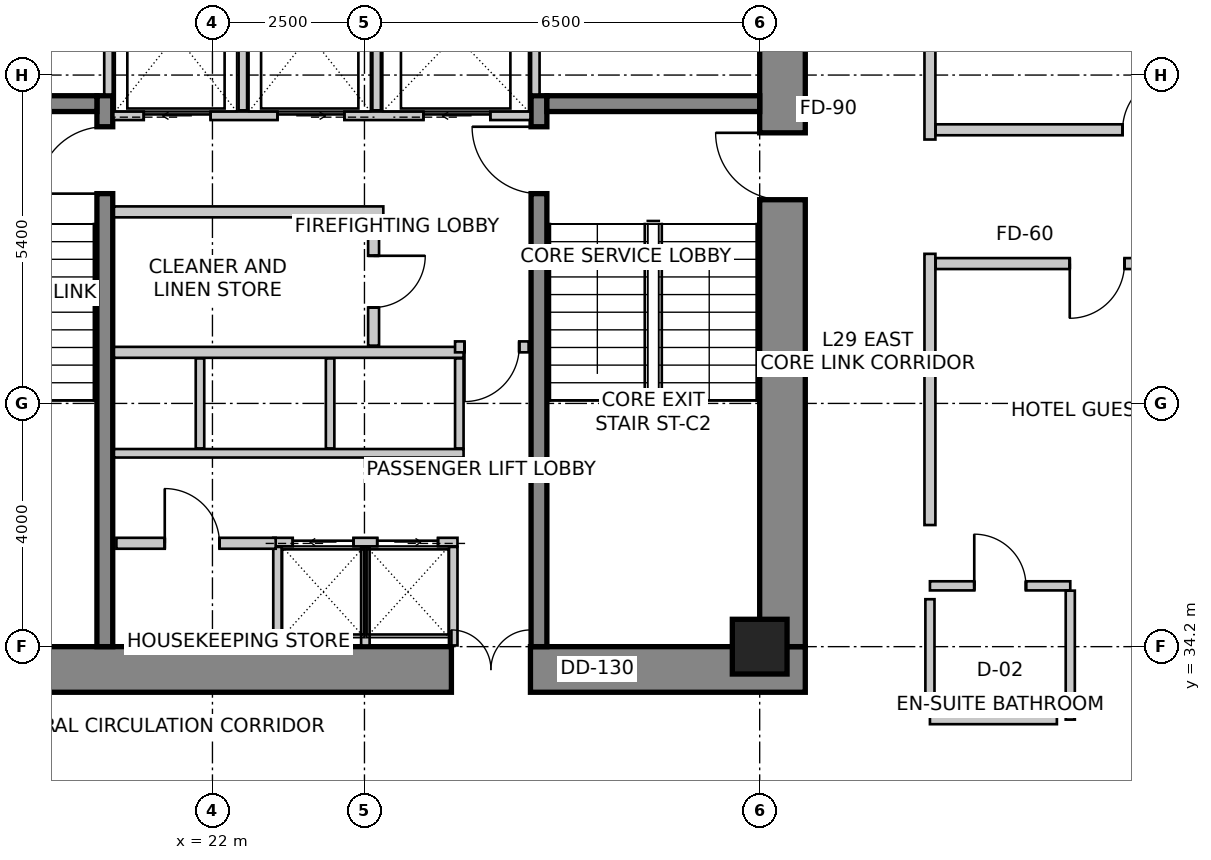
"""IFC4 building model, lengths in metres.
Left out: names, types, materials, properties, quantities, classifications, styles, units other than length and angle.
Written with IfcOpenShell. Run it as: python <this file> out.ifc"""

import sys

from ifc_helpers import new_model, si_unit, direction, frame, frame_2d, origin, origin_2d, place, context, subcontext, project, spatial, rectangle, extrude, source, transform, mapped, element, fill, save


model = new_model("IFC4")
c1 = context("Model", 3, precision=1e-05, world=origin(), true_north=direction((0.0, 1.0)))
c2 = subcontext(c1, "Body", "Model", "MODEL_VIEW")
j1 = project(units=[si_unit("LENGTHUNIT", "METRE"), si_unit("PLANEANGLEUNIT", "RADIAN")], contexts=[c1])
p1 = place(None, origin())
s1 = spatial("IfcSite", under=j1, at=p1, CompositionType="ELEMENT")
p2 = place(p1, origin())
s2 = spatial("IfcBuilding", under=s1, at=p2, CompositionType="ELEMENT")
p3 = place(p2, frame((0.0, 0.0, 121.4)))
s3 = spatial("IfcBuildingStorey", under=s2, at=p3, CompositionType="ELEMENT", Elevation=121.4)
p4 = place(p3, frame((15.85, 33.825, 0.0), z_axis=(0.0, 0.0, 1.0), x_axis=(1.0, 0.0, 0.0)))
e1 = element("IfcWall", 1, at=p4, inside=s3, PredefinedType="SHEAR", context=c2, shape_type="SweptSolid", body=[
    extrude(rectangle(XDim=15.9, YDim=0.75, at=frame_2d((7.95, 0.0))), origin(), (0.0, 0.0, 1.0), 3.6),
])
m1 = source(origin(), c2, "Body", "SweptSolid", [
    extrude(rectangle(XDim=1.3, YDim=2.15, at=frame_2d((0.65, 1.075))), frame((0.0, 0.385, 0.0), z_axis=(0.0, -1.0, 0.0), x_axis=(1.0, 0.0, 0.0)), (0.0, 0.0, 1.0), 0.77),
])
p5 = place(p4, frame((10.08, 0.0, 0.0)))
e2 = element("IfcOpeningElement", 2, at=p5, cuts=e1, PredefinedType="OPENING", context=c2, shape_type="MappedRepresentation", body=[
    mapped(m1, transform((0.0, 0.0, 0.0), scale=1.0)),
])
p6 = place(p3, frame((31.375, 34.2, 0.0), z_axis=(0.0, 0.0, 1.0), x_axis=(0.0, 1.0, 0.0)))
e3 = element("IfcWall", 3, at=p6, inside=s3, PredefinedType="SHEAR", context=c2, shape_type="SweptSolid", body=[
    extrude(rectangle(XDim=11.4, YDim=0.75, at=frame_2d((5.7, 0.0))), origin(), (0.0, 0.0, 1.0), 3.6),
])
m2 = source(origin(), c2, "Body", "SweptSolid", [
    extrude(rectangle(XDim=1.1, YDim=2.15, at=frame_2d((0.55, 1.075))), frame((0.0, 0.385, 0.0), z_axis=(0.0, -1.0, 0.0), x_axis=(1.0, 0.0, 0.0)), (0.0, 0.0, 1.0), 0.77),
])
p7 = place(p6, frame((7.35, 0.0, 0.0)))
e4 = element("IfcOpeningElement", 4, at=p7, cuts=e3, PredefinedType="OPENING", context=c2, shape_type="MappedRepresentation", body=[
    mapped(m2, transform((0.0, 0.0, 0.0), scale=1.0)),
])
p8 = place(p3, frame((20.23, 34.2, 0.0), z_axis=(0.0, 0.0, 1.0), x_axis=(0.0, 1.0, 0.0)))
e5 = element("IfcWall", 5, at=p8, inside=s3, PredefinedType="SHEAR", context=c2, shape_type="SweptSolid", body=[
    extrude(rectangle(XDim=9.06, YDim=0.26, at=frame_2d((4.53, 0.0))), origin(), (0.0, 0.0, 1.0), 3.6),
])
m3 = source(origin(), c2, "Body", "SweptSolid", [
    extrude(rectangle(XDim=1.1, YDim=2.15, at=frame_2d((0.55, 1.075))), frame((0.0, 0.14, 0.0), z_axis=(0.0, -1.0, 0.0), x_axis=(1.0, 0.0, 0.0)), (0.0, 0.0, 1.0), 0.28),
])
p9 = place(p8, frame((7.45, 0.0, 0.0)))
e6 = element("IfcOpeningElement", 6, at=p9, cuts=e5, PredefinedType="OPENING", context=c2, shape_type="MappedRepresentation", body=[
    mapped(m3, transform((0.0, 0.0, 0.0), scale=1.0)),
])
p10 = place(p3, frame((27.37, 34.2, 0.0), z_axis=(0.0, 0.0, 1.0), x_axis=(0.0, 1.0, 0.0)))
e7 = element("IfcWall", 7, at=p10, inside=s3, PredefinedType="SHEAR", context=c2, shape_type="SweptSolid", body=[
    extrude(rectangle(XDim=9.06, YDim=0.26, at=frame_2d((4.53, 0.0))), origin(), (0.0, 0.0, 1.0), 3.6),
])
p11 = place(p10, frame((7.45, 0.0, 0.0)))
e8 = element("IfcOpeningElement", 8, at=p11, cuts=e7, PredefinedType="OPENING", context=c2, shape_type="MappedRepresentation", body=[
    mapped(m3, transform((0.0, 0.0, 0.0), scale=1.0)),
])
for number, where, z_axis, x_axis in (
    (9, (16.6, 43.13, 0.0), (0.0, 0.0, 1.0), (1.0, 0.0, 0.0)),
    (10, (27.5, 43.13, 0.0), (0.0, 0.0, 1.0), (1.0, 0.0, 0.0)),
):
    element("IfcWall", number, at=place(p3, frame(where, z_axis=z_axis, x_axis=x_axis)), inside=s3, PredefinedType="SHEAR", context=c2, shape_type="SweptSolid", body=[
        extrude(rectangle(XDim=3.5, YDim=0.26, at=frame_2d((1.75, 0.0))), origin(), (0.0, 0.0, 1.0), 3.6),
    ])
m4 = source(origin(), c2, "Body", "SweptSolid", [
    extrude(rectangle(XDim=0.9, YDim=0.9, at=origin_2d()), origin(), (0.0, 0.0, 1.0), 3.6),
])
p12 = place(p3, frame((31.0, 34.2, 0.0), z_axis=(0.0, 0.0, 1.0), x_axis=(1.0, 0.0, 0.0)))
e11 = element("IfcColumn", 11, at=p12, inside=s3, PredefinedType="COLUMN", context=c2, shape_type="MappedRepresentation", body=[
    mapped(m4, transform((0.0, 0.0, 0.0), scale=1.0)),
])
p13 = place(p3, frame((20.37, 42.93, 0.0), z_axis=(0.0, 0.0, 1.0), x_axis=(1.0, 0.0, 0.0)))
e12 = element("IfcWall", 12, at=p13, inside=s3, PredefinedType="SOLIDWALL", context=c2, shape_type="SweptSolid", body=[
    extrude(rectangle(XDim=6.86, YDim=0.14, at=frame_2d((3.43, 0.0))), origin(), (0.0, 0.0, 1.0), 3.35),
])
m5 = source(origin(), c2, "Body", "SweptSolid", [
    extrude(rectangle(XDim=1.1, YDim=2.15, at=frame_2d((0.55, 1.075))), frame((0.0, 0.08, 0.0), z_axis=(0.0, -1.0, 0.0), x_axis=(1.0, 0.0, 0.0)), (0.0, 0.0, 1.0), 0.16),
])
p14 = place(p13, frame((0.5, 0.0, 0.0)))
e13 = element("IfcOpeningElement", 13, at=p14, cuts=e12, PredefinedType="OPENING", context=c2, shape_type="MappedRepresentation", body=[
    mapped(m5, transform((0.0, 0.0, 0.0), scale=1.0)),
])
p15 = place(p13, frame((2.7, 0.0, 0.0)))
e14 = element("IfcOpeningElement", 14, at=p15, cuts=e12, PredefinedType="OPENING", context=c2, shape_type="MappedRepresentation", body=[
    mapped(m5, transform((0.0, 0.0, 0.0), scale=1.0)),
])
p16 = place(p13, frame((5.1, 0.0, 0.0)))
e15 = element("IfcOpeningElement", 15, at=p16, cuts=e12, PredefinedType="OPENING", context=c2, shape_type="MappedRepresentation", body=[
    mapped(m5, transform((0.0, 0.0, 0.0), scale=1.0)),
])
for number, where, z_axis, x_axis in (
    (16, (20.29, 43.28, 0.0), (0.0, 0.0, 1.0), (0.0, 1.0, 0.0)),
    (17, (27.31, 43.28, 0.0), (0.0, 0.0, 1.0), (0.0, 1.0, 0.0)),
):
    element("IfcWall", number, at=place(p3, frame(where, z_axis=z_axis, x_axis=x_axis)), inside=s3, PredefinedType="SOLIDWALL", context=c2, shape_type="SweptSolid", body=[
        extrude(rectangle(XDim=2.3, YDim=0.14, at=frame_2d((1.15, 0.0))), origin(), (0.0, 0.0, 1.0), 3.35),
    ])
for number, where, z_axis, x_axis in (
    (18, (22.5, 43.02, 0.0), (0.0, 0.0, 1.0), (0.0, 1.0, 0.0)),
    (19, (24.7, 43.02, 0.0), (0.0, 0.0, 1.0), (0.0, 1.0, 0.0)),
):
    element("IfcWall", number, at=place(p3, frame(where, z_axis=z_axis, x_axis=x_axis)), inside=s3, PredefinedType="SOLIDWALL", context=c2, shape_type="SweptSolid", body=[
        extrude(rectangle(XDim=2.56, YDim=0.14, at=frame_2d((1.28, 0.0))), origin(), (0.0, 0.0, 1.0), 3.35),
    ])
p17 = place(p3, frame((23.0, 35.92, 0.0), z_axis=(0.0, 0.0, 1.0), x_axis=(1.0, 0.0, 0.0)))
e20 = element("IfcWall", 20, at=p17, inside=s3, PredefinedType="SOLIDWALL", context=c2, shape_type="SweptSolid", body=[
    extrude(rectangle(XDim=3.03, YDim=0.14, at=frame_2d((1.515, 0.0))), origin(), (0.0, 0.0, 1.0), 3.35),
])
m6 = source(origin(), c2, "Body", "SweptSolid", [
    extrude(rectangle(XDim=1.0, YDim=2.15, at=frame_2d((0.5, 1.075))), frame((0.0, 0.08, 0.0), z_axis=(0.0, -1.0, 0.0), x_axis=(1.0, 0.0, 0.0)), (0.0, 0.0, 1.0), 0.16),
])
p18 = place(p17, frame((0.32, 0.0, 0.0)))
e21 = element("IfcOpeningElement", 21, at=p18, cuts=e20, PredefinedType="OPENING", context=c2, shape_type="MappedRepresentation", body=[
    mapped(m6, transform((0.0, 0.0, 0.0), scale=1.0)),
])
p19 = place(p17, frame((1.71, 0.0, 0.0)))
e22 = element("IfcOpeningElement", 22, at=p19, cuts=e20, PredefinedType="OPENING", context=c2, shape_type="MappedRepresentation", body=[
    mapped(m6, transform((0.0, 0.0, 0.0), scale=1.0)),
])
for number, where, z_axis, x_axis in (
    (23, (25.96, 34.22, 0.0), (0.0, 0.0, 1.0), (0.0, 1.0, 0.0)),
    (24, (23.07, 34.22, 0.0), (0.0, 0.0, 1.0), (0.0, 1.0, 0.0)),
    (25, (24.515, 34.22, 0.0), (0.0, 0.0, 1.0), (0.0, 1.0, 0.0)),
):
    element("IfcWall", number, at=place(p3, frame(where, z_axis=z_axis, x_axis=x_axis)), inside=s3, PredefinedType="SOLIDWALL", context=c2, shape_type="SweptSolid", body=[
        extrude(rectangle(XDim=1.62, YDim=0.14, at=frame_2d((0.81, 0.0))), origin(), (0.0, 0.0, 1.0), 2.642),
    ])
p20 = place(p3, frame((20.38, 37.38, 0.0), z_axis=(0.0, 0.0, 1.0), x_axis=(1.0, 0.0, 0.0)))
e26 = element("IfcWall", 26, at=p20, inside=s3, PredefinedType="SOLIDWALL", context=c2, shape_type="SweptSolid", body=[
    extrude(rectangle(XDim=5.75, YDim=0.14, at=frame_2d((2.875, 0.0))), origin(), (0.0, 0.0, 1.0), 3.35),
])
p21 = place(p3, frame((20.38, 39.04, 0.0), z_axis=(0.0, 0.0, 1.0), x_axis=(1.0, 0.0, 0.0)))
e27 = element("IfcWall", 27, at=p21, inside=s3, PredefinedType="SOLIDWALL", context=c2, shape_type="SweptSolid", body=[
    extrude(rectangle(XDim=5.75, YDim=0.18, at=frame_2d((2.875, 0.0))), origin(), (0.0, 0.0, 1.0), 3.35),
])
for number, where, z_axis, x_axis in (
    (28, (26.06, 37.46, 0.0), (0.0, 0.0, 1.0), (0.0, 1.0, 0.0)),
    (29, (21.795, 37.46, 0.0), (0.0, 0.0, 1.0), (0.0, 1.0, 0.0)),
    (30, (23.935, 37.46, 0.0), (0.0, 0.0, 1.0), (0.0, 1.0, 0.0)),
):
    element("IfcWall", number, at=place(p3, frame(where, z_axis=z_axis, x_axis=x_axis)), inside=s3, PredefinedType="SOLIDWALL", context=c2, shape_type="SweptSolid", body=[
        extrude(rectangle(XDim=1.48, YDim=0.14, at=frame_2d((0.74, 0.0))), origin(), (0.0, 0.0, 1.0), 3.35),
    ])
p22 = place(p3, frame((24.81, 41.35, 0.0), z_axis=(0.0, 0.0, 1.0), x_axis=(-1.0, 0.0, 0.0)))
e31 = element("IfcWall", 31, at=p22, inside=s3, PredefinedType="PARTITIONING", context=c2, shape_type="SweptSolid", body=[
    extrude(rectangle(XDim=4.43, YDim=0.18, at=frame_2d((2.215, 0.0))), origin(), (0.0, 0.0, 1.0), 3.35),
])
p23 = place(p3, frame((24.65, 41.256, 0.0), z_axis=(0.0, 0.0, 1.0), x_axis=(0.0, -1.0, 0.0)))
e32 = element("IfcWall", 32, at=p23, inside=s3, PredefinedType="PARTITIONING", context=c2, shape_type="SweptSolid", body=[
    extrude(rectangle(XDim=2.106, YDim=0.18, at=frame_2d((1.053, 0.0))), origin(), (0.0, 0.0, 1.0), 3.35),
])
m7 = source(origin(), c2, "Body", "SweptSolid", [
    extrude(rectangle(XDim=0.85, YDim=2.15, at=frame_2d((0.425, 1.075))), frame((0.0, 0.1, 0.0), z_axis=(0.0, -1.0, 0.0), x_axis=(1.0, 0.0, 0.0)), (0.0, 0.0, 1.0), 0.2),
])
p24 = place(p23, frame((0.628, 0.0, 0.0)))
e33 = element("IfcOpeningElement", 33, at=p24, cuts=e32, PredefinedType="OPENING", context=c2, shape_type="MappedRepresentation", body=[
    mapped(m7, transform((0.0, 0.0, 0.0), scale=1.0)),
])
p25 = place(p3, frame((27.2, 39.13, 0.0), z_axis=(0.0, 0.0, 1.0), x_axis=(-1.0, 0.0, 0.0)))
e34 = element("IfcWall", 34, at=p25, inside=s3, PredefinedType="PARTITIONING", context=c2, shape_type="SweptSolid", body=[
    extrude(rectangle(XDim=1.21, YDim=0.18, at=frame_2d((0.605, 0.0))), origin(), (0.0, 0.0, 1.0), 3.35),
])
m8 = source(origin(), c2, "Body", "SweptSolid", [
    extrude(rectangle(XDim=0.9, YDim=2.15, at=frame_2d((0.45, 1.075))), frame((0.0, 0.1, 0.0), z_axis=(0.0, -1.0, 0.0), x_axis=(1.0, 0.0, 0.0)), (0.0, 0.0, 1.0), 0.2),
])
p26 = place(p25, frame((0.155, 0.0, 0.0)))
e35 = element("IfcOpeningElement", 35, at=p26, cuts=e34, PredefinedType="OPENING", context=c2, shape_type="MappedRepresentation", body=[
    mapped(m8, transform((0.0, 0.0, 0.0), scale=1.0)),
])
p27 = place(p3, frame((20.42, 35.9, 0.0), z_axis=(0.0, 0.0, 1.0), x_axis=(1.0, 0.0, 0.0)))
e36 = element("IfcWall", 36, at=p27, inside=s3, PredefinedType="PARTITIONING", context=c2, shape_type="SweptSolid", body=[
    extrude(rectangle(XDim=2.62, YDim=0.18, at=frame_2d((1.31, 0.0))), origin(), (0.0, 0.0, 1.0), 3.35),
])
p28 = place(p27, frame((0.796, 0.0, 0.0)))
e37 = element("IfcOpeningElement", 37, at=p28, cuts=e36, PredefinedType="OPENING", context=c2, shape_type="MappedRepresentation", body=[
    mapped(m8, transform((0.0, 0.0, 0.0), scale=1.0)),
])
p29 = place(p3, frame((33.8, 40.66, 0.0), z_axis=(0.0, 0.0, 1.0), x_axis=(0.0, -1.0, 0.0)))
e38 = element("IfcWall", 38, at=p29, inside=s3, PredefinedType="PARTITIONING", context=c2, shape_type="SweptSolid", body=[
    extrude(rectangle(XDim=4.46, YDim=0.18, at=frame_2d((2.23, 0.0))), origin(), (0.0, 0.0, 1.0), 3.35),
])
p30 = place(p3, frame((33.8, 46.256, 0.0), z_axis=(0.0, 0.0, 1.0), x_axis=(0.0, -1.0, 0.0)))
e39 = element("IfcWall", 39, at=p30, inside=s3, PredefinedType="PARTITIONING", context=c2, shape_type="SweptSolid", body=[
    extrude(rectangle(XDim=3.716, YDim=0.18, at=frame_2d((1.858, 0.0))), origin(), (0.0, 0.0, 1.0), 2.922),
])
p31 = place(p3, frame((39.205, 40.5, 0.0), z_axis=(0.0, 0.0, 1.0), x_axis=(-1.0, 0.0, 0.0)))
e40 = element("IfcWall", 40, at=p31, inside=s3, PredefinedType="PARTITIONING", context=c2, shape_type="SweptSolid", body=[
    extrude(rectangle(XDim=5.311, YDim=0.18, at=frame_2d((2.656, 0.0))), origin(), (0.0, 0.0, 1.0), 2.803),
])
p32 = place(p31, frame((2.206, 0.0, 0.0)))
e41 = element("IfcOpeningElement", 41, at=p32, cuts=e40, PredefinedType="OPENING", context=c2, shape_type="MappedRepresentation", body=[
    mapped(m8, transform((0.0, 0.0, 0.0), scale=1.0)),
])
p33 = place(p3, frame((33.894, 42.7, 0.0), z_axis=(0.0, 0.0, 1.0), x_axis=(1.0, 0.0, 0.0)))
e42 = element("IfcWall", 42, at=p33, inside=s3, PredefinedType="PARTITIONING", context=c2, shape_type="SweptSolid", body=[
    extrude(rectangle(XDim=8.266, YDim=0.18, at=frame_2d((4.133, 0.0))), origin(), (0.0, 0.0, 1.0), 2.803),
])
p34 = place(p33, frame((3.075, 0.0, 0.0)))
e43 = element("IfcOpeningElement", 43, at=p34, cuts=e42, PredefinedType="OPENING", context=c2, shape_type="MappedRepresentation", body=[
    mapped(m8, transform((0.0, 0.0, 0.0), scale=1.0)),
])
p35 = place(p3, frame((33.8, 35.2, 0.0), z_axis=(0.0, 0.0, 1.0), x_axis=(1.0, 0.0, 0.0)))
e44 = element("IfcWall", 44, at=p35, inside=s3, PredefinedType="PARTITIONING", context=c2, shape_type="SweptSolid", body=[
    extrude(rectangle(XDim=2.308, YDim=0.15, at=frame_2d((1.154, 0.0))), origin(), (0.0, 0.0, 1.0), 3.35),
])
m9 = source(origin(), c2, "Body", "SweptSolid", [
    extrude(rectangle(XDim=0.85, YDim=2.15, at=frame_2d((0.425, 1.075))), frame((0.0, 0.085, 0.0), z_axis=(0.0, -1.0, 0.0), x_axis=(1.0, 0.0, 0.0)), (0.0, 0.0, 1.0), 0.17),
])
p36 = place(p35, frame((0.729, 0.0, 0.0)))
e45 = element("IfcOpeningElement", 45, at=p36, cuts=e44, PredefinedType="OPENING", context=c2, shape_type="MappedRepresentation", body=[
    mapped(m9, transform((0.0, 0.0, 0.0), scale=1.0)),
])
p37 = place(p3, frame((36.108, 35.121, 0.0), z_axis=(0.0, 0.0, 1.0), x_axis=(0.0, -1.0, 0.0)))
e46 = element("IfcWall", 46, at=p37, inside=s3, PredefinedType="PARTITIONING", context=c2, shape_type="SweptSolid", body=[
    extrude(rectangle(XDim=2.121, YDim=0.15, at=frame_2d((1.061, 0.0))), origin(), (0.0, 0.0, 1.0), 3.35),
])
p38 = place(p3, frame((35.888, 33.0, 0.0), z_axis=(0.0, 0.0, 1.0), x_axis=(-1.0, 0.0, 0.0)))
e47 = element("IfcWall", 47, at=p38, inside=s3, PredefinedType="PARTITIONING", context=c2, shape_type="SweptSolid", body=[
    extrude(rectangle(XDim=2.088, YDim=0.15, at=frame_2d((1.044, 0.0))), origin(), (0.0, 0.0, 1.0), 3.35),
])
p39 = place(p3, frame((33.8, 33.22, 0.0), z_axis=(0.0, 0.0, 1.0), x_axis=(0.0, 1.0, 0.0)))
e48 = element("IfcWall", 48, at=p39, inside=s3, PredefinedType="PARTITIONING", context=c2, shape_type="SweptSolid", body=[
    extrude(rectangle(XDim=1.76, YDim=0.15, at=frame_2d((0.88, 0.0))), origin(), (0.0, 0.0, 1.0), 3.35),
])
m10 = source(origin(), c2, "Body", "SweptSolid", [
    extrude(rectangle(XDim=1.1, YDim=2.15, at=frame_2d((0.55, 1.075))), frame((0.0, 0.025, 0.0), z_axis=(0.0, -1.0, 0.0), x_axis=(1.0, 0.0, 0.0)), (0.0, 0.0, 1.0), 0.05),
])
p40 = place(p14, origin())
e49 = element("IfcDoor", 49, at=p40, inside=s3, OperationType="SLIDING_TO_LEFT", PredefinedType="DOOR", context=c2, shape_type="MappedRepresentation", body=[
    mapped(m10, transform((0.0, 0.0, 0.0), scale=1.0)),
])
fill(e13, e49)
p41 = place(p15, origin())
e50 = element("IfcDoor", 50, at=p41, inside=s3, OperationType="SLIDING_TO_RIGHT", PredefinedType="DOOR", context=c2, shape_type="MappedRepresentation", body=[
    mapped(m10, transform((0.0, 0.0, 0.0), scale=1.0)),
])
fill(e14, e50)
m11 = source(origin(), c2, "Body", "SweptSolid", [
    extrude(rectangle(XDim=1.1, YDim=2.15, at=frame_2d((0.55, 1.075))), frame((0.0, 0.025, 0.0), z_axis=(0.0, -1.0, 0.0), x_axis=(1.0, 0.0, 0.0)), (0.0, 0.0, 1.0), 0.05),
])
p42 = place(p16, origin())
e51 = element("IfcDoor", 51, at=p42, inside=s3, OperationType="SLIDING_TO_LEFT", PredefinedType="DOOR", context=c2, shape_type="MappedRepresentation", body=[
    mapped(m11, transform((0.0, 0.0, 0.0), scale=1.0)),
])
fill(e15, e51)
m12 = source(origin(), c2, "Body", "SweptSolid", [
    extrude(rectangle(XDim=1.0, YDim=2.15, at=frame_2d((0.5, 1.075))), frame((0.0, 0.025, 0.0), z_axis=(0.0, -1.0, 0.0), x_axis=(1.0, 0.0, 0.0)), (0.0, 0.0, 1.0), 0.05),
])
p43 = place(p18, origin())
e52 = element("IfcDoor", 52, at=p43, inside=s3, OperationType="SLIDING_TO_LEFT", PredefinedType="DOOR", context=c2, shape_type="MappedRepresentation", body=[
    mapped(m12, transform((0.0, 0.0, 0.0), scale=1.0)),
])
fill(e21, e52)
p44 = place(p19, origin())
e53 = element("IfcDoor", 53, at=p44, inside=s3, OperationType="SLIDING_TO_RIGHT", PredefinedType="DOOR", context=c2, shape_type="MappedRepresentation", body=[
    mapped(m12, transform((0.0, 0.0, 0.0), scale=1.0)),
])
fill(e22, e53)
m13 = source(origin(), c2, "Body", "SweptSolid", [
    extrude(rectangle(XDim=1.1, YDim=2.15, at=frame_2d((0.55, 1.075))), frame((0.0, 0.025, 0.0), z_axis=(0.0, -1.0, 0.0), x_axis=(1.0, 0.0, 0.0)), (0.0, 0.0, 1.0), 0.05),
])
p45 = place(p9, origin())
e54 = element("IfcDoor", 54, at=p45, inside=s3, OperationType="SINGLE_SWING_LEFT", PredefinedType="DOOR", context=c2, shape_type="MappedRepresentation", body=[
    mapped(m13, transform((0.0, 0.0, 0.0), scale=1.0)),
])
fill(e6, e54)
p46 = place(p11, origin())
e55 = element("IfcDoor", 55, at=p46, inside=s3, OperationType="SINGLE_SWING_RIGHT", PredefinedType="DOOR", context=c2, shape_type="MappedRepresentation", body=[
    mapped(m13, transform((0.0, 0.0, 0.0), scale=1.0)),
])
fill(e8, e55)
p47 = place(p7, origin())
e56 = element("IfcDoor", 56, at=p47, inside=s3, OperationType="SINGLE_SWING_RIGHT", PredefinedType="DOOR", context=c2, shape_type="MappedRepresentation", body=[
    mapped(m13, transform((0.0, 0.0, 0.0), scale=1.0)),
])
fill(e4, e56)
m14 = source(origin(), c2, "Body", "SweptSolid", [
    extrude(rectangle(XDim=1.3, YDim=2.15, at=frame_2d((0.65, 1.075))), frame((0.0, 0.025, 0.0), z_axis=(0.0, -1.0, 0.0), x_axis=(1.0, 0.0, 0.0)), (0.0, 0.0, 1.0), 0.05),
])
p48 = place(p5, origin())
e57 = element("IfcDoor", 57, at=p48, inside=s3, OperationType="DOUBLE_DOOR_SINGLE_SWING", PredefinedType="DOOR", context=c2, shape_type="MappedRepresentation", body=[
    mapped(m14, transform((0.0, 0.0, 0.0), scale=1.0)),
])
fill(e2, e57)
m15 = source(origin(), c2, "Body", "SweptSolid", [
    extrude(rectangle(XDim=0.85, YDim=2.15, at=frame_2d((0.425, 1.075))), frame((0.0, 0.025, 0.0), z_axis=(0.0, -1.0, 0.0), x_axis=(1.0, 0.0, 0.0)), (0.0, 0.0, 1.0), 0.05),
])
p49 = place(p24, origin())
e58 = element("IfcDoor", 58, at=p49, inside=s3, OperationType="SINGLE_SWING_LEFT", PredefinedType="DOOR", context=c2, shape_type="MappedRepresentation", body=[
    mapped(m15, transform((0.0, 0.0, 0.0), scale=1.0)),
])
fill(e33, e58)
m16 = source(origin(), c2, "Body", "SweptSolid", [
    extrude(rectangle(XDim=0.9, YDim=2.15, at=frame_2d((0.45, 1.075))), frame((0.0, 0.025, 0.0), z_axis=(0.0, -1.0, 0.0), x_axis=(1.0, 0.0, 0.0)), (0.0, 0.0, 1.0), 0.05),
])
p50 = place(p26, origin())
e59 = element("IfcDoor", 59, at=p50, inside=s3, OperationType="SINGLE_SWING_RIGHT", PredefinedType="DOOR", context=c2, shape_type="MappedRepresentation", body=[
    mapped(m16, transform((0.0, 0.0, 0.0), scale=1.0)),
])
fill(e35, e59)
p51 = place(p28, origin())
e60 = element("IfcDoor", 60, at=p51, inside=s3, OperationType="SINGLE_SWING_LEFT", PredefinedType="DOOR", context=c2, shape_type="MappedRepresentation", body=[
    mapped(m16, transform((0.0, 0.0, 0.0), scale=1.0)),
])
fill(e37, e60)
m17 = source(origin(), c2, "Body", "SweptSolid", [
    extrude(rectangle(XDim=0.85, YDim=2.15, at=frame_2d((0.425, 1.075))), frame((0.0, 0.025, 0.0), z_axis=(0.0, -1.0, 0.0), x_axis=(1.0, 0.0, 0.0)), (0.0, 0.0, 1.0), 0.05),
])
p52 = place(p36, origin())
e61 = element("IfcDoor", 61, at=p52, inside=s3, OperationType="SINGLE_SWING_LEFT", PredefinedType="DOOR", context=c2, shape_type="MappedRepresentation", body=[
    mapped(m17, transform((0.0, 0.0, 0.0), scale=1.0)),
])
fill(e45, e61)
p53 = place(p32, origin())
e62 = element("IfcDoor", 62, at=p53, inside=s3, OperationType="SINGLE_SWING_RIGHT", PredefinedType="DOOR", context=c2, shape_type="MappedRepresentation", body=[
    mapped(m16, transform((0.0, 0.0, 0.0), scale=1.0)),
])
fill(e41, e62)
p54 = place(p34, origin())
e63 = element("IfcDoor", 63, at=p54, inside=s3, OperationType="SINGLE_SWING_RIGHT", PredefinedType="DOOR", context=c2, shape_type="MappedRepresentation", body=[
    mapped(m16, transform((0.0, 0.0, 0.0), scale=1.0)),
])
fill(e43, e63)
save(model, sys.argv[1])
